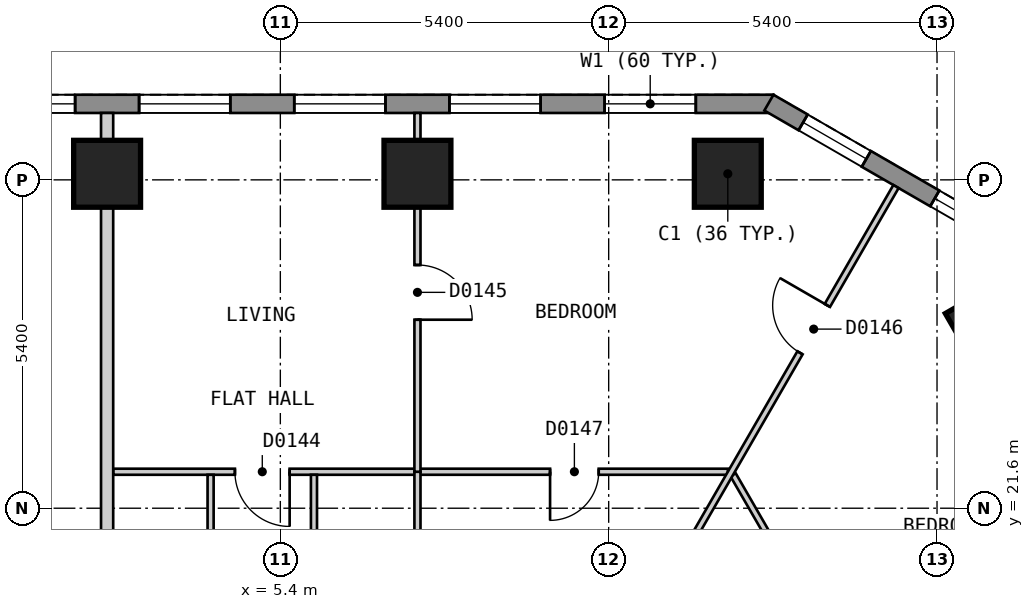
"""IFC4 building model, lengths in metres.
Left out: names, types, materials, properties, quantities, classifications, styles, units other than length and angle.
Written with IfcOpenShell. Run it as: python <this file> out.ifc"""

import sys

from ifc_helpers import new_model, si_unit, direction, frame, frame_2d, origin, origin_2d, place, context, subcontext, project, spatial, polyline, rectangle, outline, extrude, element, fill, save


model = new_model("IFC4")
c1 = context("Model", 3, precision=1e-05, world=origin(), true_north=direction((0.0, 1.0)))
c2 = subcontext(c1, "Body", "Model", "MODEL_VIEW")
j1 = project(units=[si_unit("LENGTHUNIT", "METRE"), si_unit("PLANEANGLEUNIT", "RADIAN")], contexts=[c1])
p1 = place(None, origin())
s1 = spatial("IfcSite", under=j1, at=p1, CompositionType="ELEMENT")
p2 = place(p1, origin())
s2 = spatial("IfcBuilding", under=s1, at=p2, CompositionType="ELEMENT")
p3 = place(p2, frame((0.0, 0.0, 29.4)))
s3 = spatial("IfcBuildingStorey", under=s2, at=p3, CompositionType="ELEMENT", Elevation=29.4)
for number, where, z_axis, x_axis in (
    (1, (12.759, 27.1, 0.0), (0.0, 0.0, 1.0), (-1.0, 0.0, 0.0)),
    (2, (7.655, 27.1, 0.0), (0.0, 0.0, 1.0), (-1.0, 0.0, 0.0)),
    (3, (2.551, 27.1, 0.0), (0.0, 0.0, 1.0), (-1.0, 0.0, 0.0)),
    (4, (17.089, 24.601, 0.0), (0.0, 0.0, 1.0), (-0.5, 0.866, 0.0)),
):
    element("IfcColumn", number, at=place(p3, frame(where, z_axis=z_axis, x_axis=x_axis)), inside=s3, PredefinedType="COLUMN", context=c2, shape_type="SweptSolid", body=[
        extrude(rectangle(XDim=1.1, YDim=1.1, at=origin_2d()), origin(), (0.0, 0.0, 1.0), 3.0),
    ])
p4 = place(p3, frame((13.51, 28.25, 0.0), z_axis=(0.0, 0.0, 1.0), x_axis=(-1.0, 0.0, 0.0)))
e5 = element("IfcWall", 5, at=p4, inside=s3, PredefinedType="SOLIDWALL", context=c2, shape_type="SweptSolid", body=[
    extrude(outline(polyline([(0.0, -0.15), (27.02, -0.15), (26.94, 0.15), (0.08, 0.15), (0.0, -0.15)])), origin(), (0.0, 0.0, 1.0), 2.7),
])
p5 = place(p4, frame((1.277, 0.0, 0.15)))
e6 = element("IfcOpeningElement", 6, at=p5, cuts=e5, PredefinedType="OPENING", context=c2, shape_type="SweptSolid", body=[
    extrude(rectangle(XDim=1.5, YDim=2.1, at=frame_2d((0.75, 1.05))), frame((0.0, 0.16, 0.0), z_axis=(0.0, -1.0, 0.0), x_axis=(1.0, 0.0, 0.0)), (0.0, 0.0, 1.0), 0.32),
])
p6 = place(p4, frame((3.829, 0.0, 0.15)))
e7 = element("IfcOpeningElement", 7, at=p6, cuts=e5, PredefinedType="OPENING", context=c2, shape_type="SweptSolid", body=[
    extrude(rectangle(XDim=1.5, YDim=2.1, at=frame_2d((0.75, 1.05))), frame((0.0, 0.16, 0.0), z_axis=(0.0, -1.0, 0.0), x_axis=(1.0, 0.0, 0.0)), (0.0, 0.0, 1.0), 0.32),
])
p7 = place(p4, frame((6.381, 0.0, 0.15)))
e8 = element("IfcOpeningElement", 8, at=p7, cuts=e5, PredefinedType="OPENING", context=c2, shape_type="SweptSolid", body=[
    extrude(rectangle(XDim=1.5, YDim=2.1, at=frame_2d((0.75, 1.05))), frame((0.0, 0.16, 0.0), z_axis=(0.0, -1.0, 0.0), x_axis=(1.0, 0.0, 0.0)), (0.0, 0.0, 1.0), 0.32),
])
p8 = place(p4, frame((8.933, 0.0, 0.15)))
e9 = element("IfcOpeningElement", 9, at=p8, cuts=e5, PredefinedType="OPENING", context=c2, shape_type="SweptSolid", body=[
    extrude(rectangle(XDim=1.5, YDim=2.1, at=frame_2d((0.75, 1.05))), frame((0.0, 0.16, 0.0), z_axis=(0.0, -1.0, 0.0), x_axis=(1.0, 0.0, 0.0)), (0.0, 0.0, 1.0), 0.32),
])
p9 = place(p4, frame((11.485, 0.0, 0.15)))
e10 = element("IfcOpeningElement", 10, at=p9, cuts=e5, PredefinedType="OPENING", context=c2, shape_type="SweptSolid", body=[
    extrude(rectangle(XDim=1.5, YDim=2.1, at=frame_2d((0.75, 1.05))), frame((0.0, 0.16, 0.0), z_axis=(0.0, -1.0, 0.0), x_axis=(1.0, 0.0, 0.0)), (0.0, 0.0, 1.0), 0.32),
])
p10 = place(p4, frame((14.037, 0.0, 0.15)))
e11 = element("IfcOpeningElement", 11, at=p10, cuts=e5, PredefinedType="OPENING", context=c2, shape_type="SweptSolid", body=[
    extrude(rectangle(XDim=1.5, YDim=2.1, at=frame_2d((0.75, 1.05))), frame((0.0, 0.16, 0.0), z_axis=(0.0, -1.0, 0.0), x_axis=(1.0, 0.0, 0.0)), (0.0, 0.0, 1.0), 0.32),
])
p11 = place(p4, frame((16.589, 0.0, 0.15)))
e12 = element("IfcOpeningElement", 12, at=p11, cuts=e5, PredefinedType="OPENING", context=c2, shape_type="SweptSolid", body=[
    extrude(rectangle(XDim=1.5, YDim=2.1, at=frame_2d((0.75, 1.05))), frame((0.0, 0.16, 0.0), z_axis=(0.0, -1.0, 0.0), x_axis=(1.0, 0.0, 0.0)), (0.0, 0.0, 1.0), 0.32),
])
p12 = place(p4, frame((19.141, 0.0, 0.15)))
e13 = element("IfcOpeningElement", 13, at=p12, cuts=e5, PredefinedType="OPENING", context=c2, shape_type="SweptSolid", body=[
    extrude(rectangle(XDim=1.5, YDim=2.1, at=frame_2d((0.75, 1.05))), frame((0.0, 0.16, 0.0), z_axis=(0.0, -1.0, 0.0), x_axis=(1.0, 0.0, 0.0)), (0.0, 0.0, 1.0), 0.32),
])
p13 = place(p4, frame((21.693, 0.0, 0.15)))
e14 = element("IfcOpeningElement", 14, at=p13, cuts=e5, PredefinedType="OPENING", context=c2, shape_type="SweptSolid", body=[
    extrude(rectangle(XDim=1.5, YDim=2.1, at=frame_2d((0.75, 1.05))), frame((0.0, 0.16, 0.0), z_axis=(0.0, -1.0, 0.0), x_axis=(1.0, 0.0, 0.0)), (0.0, 0.0, 1.0), 0.32),
])
p14 = place(p4, frame((24.245, 0.0, 0.15)))
e15 = element("IfcOpeningElement", 15, at=p14, cuts=e5, PredefinedType="OPENING", context=c2, shape_type="SweptSolid", body=[
    extrude(rectangle(XDim=1.5, YDim=2.1, at=frame_2d((0.75, 1.05))), frame((0.0, 0.16, 0.0), z_axis=(0.0, -1.0, 0.0), x_axis=(1.0, 0.0, 0.0)), (0.0, 0.0, 1.0), 0.32),
])
p15 = place(p3, frame((17.765, 25.77, 0.0), z_axis=(0.0, 0.0, 1.0), x_axis=(-0.866010750942, 0.50002537861, 0.0)))
e16 = element("IfcWall", 16, at=p15, inside=s3, PredefinedType="SOLIDWALL", context=c2, shape_type="SweptSolid", body=[
    extrude(outline(polyline([(0.0, -0.15), (5.0, -0.15), (4.919, 0.15), (0.08, 0.15), (0.0, -0.15)])), origin(), (0.0, 0.0, 1.0), 2.7),
])
p16 = place(p15, frame((0.65, 0.0, 0.15)))
e17 = element("IfcOpeningElement", 17, at=p16, cuts=e16, PredefinedType="OPENING", context=c2, shape_type="SweptSolid", body=[
    extrude(rectangle(XDim=1.2, YDim=2.1, at=frame_2d((0.6, 1.05))), frame((0.0, 0.16, 0.0), z_axis=(0.0, -1.0, 0.0), x_axis=(1.0, 0.0, 0.0)), (0.0, 0.0, 1.0), 0.32),
])
p17 = place(p15, frame((3.15, 0.0, 0.15)))
e18 = element("IfcOpeningElement", 18, at=p17, cuts=e16, PredefinedType="OPENING", context=c2, shape_type="SweptSolid", body=[
    extrude(rectangle(XDim=1.2, YDim=2.1, at=frame_2d((0.6, 1.05))), frame((0.0, 0.16, 0.0), z_axis=(0.0, -1.0, 0.0), x_axis=(1.0, 0.0, 0.0)), (0.0, 0.0, 1.0), 0.32),
])
p18 = place(p3, frame((12.846, 22.15, 0.0), z_axis=(0.0, 0.0, 1.0), x_axis=(0.500002715276, -0.866023836113, 0.0)))
e19 = element("IfcWall", 19, at=p18, inside=s3, PredefinedType="PARTITIONING", context=c2, shape_type="SweptSolid", body=[
    extrude(rectangle(XDim=5.002, YDim=0.1, at=frame_2d((2.501, 0.0))), origin(), (0.0, 0.0, 1.0), 2.7),
])
p19 = place(p18, frame((2.122, 0.0, 0.0)))
e20 = element("IfcOpeningElement", 20, at=p19, cuts=e19, PredefinedType="OPENING", context=c2, shape_type="SweptSolid", body=[
    extrude(rectangle(XDim=0.8, YDim=2.1, at=frame_2d((0.4, 1.05))), frame((0.0, 0.06, 0.0), z_axis=(0.0, -1.0, 0.0), x_axis=(1.0, 0.0, 0.0)), (0.0, 0.0, 1.0), 0.12),
])
p20 = place(p3, frame((2.651, 22.2, 0.0), z_axis=(0.0, 0.0, 1.0), x_axis=(1.0, 0.0, 0.0)))
e21 = element("IfcWall", 21, at=p20, inside=s3, PredefinedType="PARTITIONING", context=c2, shape_type="SweptSolid", body=[
    extrude(rectangle(XDim=10.109, YDim=0.1, at=frame_2d((5.055, 0.0))), origin(), (0.0, 0.0, 1.0), 2.7),
])
p21 = place(p20, frame((2.002, 0.0, 0.0)))
e22 = element("IfcOpeningElement", 22, at=p21, cuts=e21, PredefinedType="OPENING", context=c2, shape_type="SweptSolid", body=[
    extrude(rectangle(XDim=0.9, YDim=2.1, at=frame_2d((0.45, 1.05))), frame((0.0, 0.06, 0.0), z_axis=(0.0, -1.0, 0.0), x_axis=(1.0, 0.0, 0.0)), (0.0, 0.0, 1.0), 0.12),
])
p22 = place(p20, frame((7.185, 0.0, 0.0)))
e23 = element("IfcOpeningElement", 23, at=p22, cuts=e21, PredefinedType="OPENING", context=c2, shape_type="SweptSolid", body=[
    extrude(rectangle(XDim=0.8, YDim=2.1, at=frame_2d((0.4, 1.05))), frame((0.0, 0.06, 0.0), z_axis=(0.0, -1.0, 0.0), x_axis=(1.0, 0.0, 0.0)), (0.0, 0.0, 1.0), 0.12),
])
p23 = place(p3, frame((10.393, 18.0, 0.0), z_axis=(0.0, 0.0, 1.0), x_axis=(0.499945497007, 0.866056868816, 0.0)))
e24 = element("IfcWall", 24, at=p23, inside=s3, PredefinedType="PARTITIONING", context=c2, shape_type="SweptSolid", body=[
    extrude(rectangle(XDim=10.265, YDim=0.1, at=frame_2d((5.132, 0.0))), origin(), (0.0, 0.0, 1.0), 2.7),
])
p24 = place(p23, frame((7.108, 0.0, 0.0)))
e25 = element("IfcOpeningElement", 25, at=p24, cuts=e24, PredefinedType="OPENING", context=c2, shape_type="SweptSolid", body=[
    extrude(rectangle(XDim=0.9, YDim=2.1, at=frame_2d((0.45, 1.05))), frame((0.0, 0.06, 0.0), z_axis=(0.0, -1.0, 0.0), x_axis=(1.0, 0.0, 0.0)), (0.0, 0.0, 1.0), 0.12),
])
p25 = place(p3, frame((4.253, 18.1, 0.0), z_axis=(0.0, 0.0, 1.0), x_axis=(0.0, 1.0, 0.0)))
e26 = element("IfcWall", 26, at=p25, inside=s3, PredefinedType="PARTITIONING", context=c2, shape_type="SweptSolid", body=[
    extrude(rectangle(XDim=4.05, YDim=0.1, at=frame_2d((2.025, 0.0))), origin(), (0.0, 0.0, 1.0), 2.7),
])
p26 = place(p25, frame((1.6, 0.0, 0.0)))
e27 = element("IfcOpeningElement", 27, at=p26, cuts=e26, PredefinedType="OPENING", context=c2, shape_type="SweptSolid", body=[
    extrude(rectangle(XDim=0.8, YDim=2.1, at=frame_2d((0.4, 1.05))), frame((0.0, 0.06, 0.0), z_axis=(0.0, -1.0, 0.0), x_axis=(1.0, 0.0, 0.0)), (0.0, 0.0, 1.0), 0.12),
])
p27 = place(p3, frame((5.953, 18.1, 0.0), z_axis=(0.0, 0.0, 1.0), x_axis=(0.0, 1.0, 0.0)))
e28 = element("IfcWall", 28, at=p27, inside=s3, PredefinedType="PARTITIONING", context=c2, shape_type="SweptSolid", body=[
    extrude(rectangle(XDim=4.05, YDim=0.1, at=frame_2d((2.025, 0.0))), origin(), (0.0, 0.0, 1.0), 2.7),
])
p28 = place(p27, frame((1.55, 0.0, 0.0)))
e29 = element("IfcOpeningElement", 29, at=p28, cuts=e28, PredefinedType="OPENING", context=c2, shape_type="SweptSolid", body=[
    extrude(rectangle(XDim=0.9, YDim=2.1, at=frame_2d((0.45, 1.05))), frame((0.0, 0.06, 0.0), z_axis=(0.0, -1.0, 0.0), x_axis=(1.0, 0.0, 0.0)), (0.0, 0.0, 1.0), 0.12),
])
p29 = place(p3, frame((7.655, 18.1, 0.0), z_axis=(0.0, 0.0, 1.0), x_axis=(0.0, 1.0, 0.0)))
e30 = element("IfcWall", 30, at=p29, inside=s3, PredefinedType="PARTITIONING", context=c2, shape_type="SweptSolid", body=[
    extrude(rectangle(XDim=4.1, YDim=0.1, at=frame_2d((2.05, 0.0))), origin(), (0.0, 0.0, 1.0), 2.7),
])
p30 = place(p3, frame((2.551, 18.1, 0.0), z_axis=(0.0, 0.0, 1.0), x_axis=(0.0, 1.0, 0.0)))
e31 = element("IfcWall", 31, at=p30, inside=s3, PredefinedType="PARTITIONING", context=c2, shape_type="SweptSolid", body=[
    extrude(rectangle(XDim=10.0, YDim=0.2, at=frame_2d((5.0, 0.0))), origin(), (0.0, 0.0, 1.0), 2.7),
])
p31 = place(p3, frame((7.655, 22.2, 0.0), z_axis=(0.0, 0.0, 1.0), x_axis=(0.0, 1.0, 0.0)))
e32 = element("IfcWall", 32, at=p31, inside=s3, PredefinedType="PARTITIONING", context=c2, shape_type="SweptSolid", body=[
    extrude(rectangle(XDim=5.9, YDim=0.1, at=frame_2d((2.95, 0.0))), origin(), (0.0, 0.0, 1.0), 2.7),
])
p32 = place(p31, frame((2.5, 0.0, 0.0)))
e33 = element("IfcOpeningElement", 33, at=p32, cuts=e32, PredefinedType="OPENING", context=c2, shape_type="SweptSolid", body=[
    extrude(rectangle(XDim=0.9, YDim=2.1, at=frame_2d((0.45, 1.05))), frame((0.0, 0.06, 0.0), z_axis=(0.0, -1.0, 0.0), x_axis=(1.0, 0.0, 0.0)), (0.0, 0.0, 1.0), 0.12),
])
p33 = place(p5, origin())
e34 = element("IfcWindow", 34, at=p33, inside=s3, PartitioningType="SINGLE_PANEL", PredefinedType="WINDOW", context=c2, shape_type="SweptSolid", body=[
    extrude(rectangle(XDim=1.5, YDim=2.1, at=frame_2d((0.75, 1.05))), frame((0.0, 0.03, 0.0), z_axis=(0.0, -1.0, 0.0), x_axis=(1.0, 0.0, 0.0)), (0.0, 0.0, 1.0), 0.06),
])
fill(e6, e34)
p34 = place(p6, origin())
e35 = element("IfcWindow", 35, at=p34, inside=s3, PartitioningType="SINGLE_PANEL", PredefinedType="WINDOW", context=c2, shape_type="SweptSolid", body=[
    extrude(rectangle(XDim=1.5, YDim=2.1, at=frame_2d((0.75, 1.05))), frame((0.0, 0.03, 0.0), z_axis=(0.0, -1.0, 0.0), x_axis=(1.0, 0.0, 0.0)), (0.0, 0.0, 1.0), 0.06),
])
fill(e7, e35)
p35 = place(p7, origin())
e36 = element("IfcWindow", 36, at=p35, inside=s3, PartitioningType="SINGLE_PANEL", PredefinedType="WINDOW", context=c2, shape_type="SweptSolid", body=[
    extrude(rectangle(XDim=1.5, YDim=2.1, at=frame_2d((0.75, 1.05))), frame((0.0, 0.03, 0.0), z_axis=(0.0, -1.0, 0.0), x_axis=(1.0, 0.0, 0.0)), (0.0, 0.0, 1.0), 0.06),
])
fill(e8, e36)
p36 = place(p8, origin())
e37 = element("IfcWindow", 37, at=p36, inside=s3, PartitioningType="SINGLE_PANEL", PredefinedType="WINDOW", context=c2, shape_type="SweptSolid", body=[
    extrude(rectangle(XDim=1.5, YDim=2.1, at=frame_2d((0.75, 1.05))), frame((0.0, 0.03, 0.0), z_axis=(0.0, -1.0, 0.0), x_axis=(1.0, 0.0, 0.0)), (0.0, 0.0, 1.0), 0.06),
])
fill(e9, e37)
p37 = place(p9, origin())
e38 = element("IfcWindow", 38, at=p37, inside=s3, PartitioningType="SINGLE_PANEL", PredefinedType="WINDOW", context=c2, shape_type="SweptSolid", body=[
    extrude(rectangle(XDim=1.5, YDim=2.1, at=frame_2d((0.75, 1.05))), frame((0.0, 0.03, 0.0), z_axis=(0.0, -1.0, 0.0), x_axis=(1.0, 0.0, 0.0)), (0.0, 0.0, 1.0), 0.06),
])
fill(e10, e38)
p38 = place(p16, origin())
e39 = element("IfcWindow", 39, at=p38, inside=s3, PartitioningType="SINGLE_PANEL", PredefinedType="WINDOW", context=c2, shape_type="SweptSolid", body=[
    extrude(rectangle(XDim=1.2, YDim=2.1, at=frame_2d((0.6, 1.05))), frame((0.0, 0.03, 0.0), z_axis=(0.0, -1.0, 0.0), x_axis=(1.0, 0.0, 0.0)), (0.0, 0.0, 1.0), 0.06),
])
fill(e17, e39)
p39 = place(p17, origin())
e40 = element("IfcWindow", 40, at=p39, inside=s3, PartitioningType="SINGLE_PANEL", PredefinedType="WINDOW", context=c2, shape_type="SweptSolid", body=[
    extrude(rectangle(XDim=1.2, YDim=2.1, at=frame_2d((0.6, 1.05))), frame((0.0, 0.03, 0.0), z_axis=(0.0, -1.0, 0.0), x_axis=(1.0, 0.0, 0.0)), (0.0, 0.0, 1.0), 0.06),
])
fill(e18, e40)
p40 = place(p21, origin())
e41 = element("IfcDoor", 41, at=p40, inside=s3, OperationType="SINGLE_SWING_RIGHT", PredefinedType="DOOR", context=c2, shape_type="SweptSolid", body=[
    extrude(rectangle(XDim=0.9, YDim=2.1, at=frame_2d((0.45, 1.05))), frame((0.0, 0.025, 0.0), z_axis=(0.0, -1.0, 0.0), x_axis=(1.0, 0.0, 0.0)), (0.0, 0.0, 1.0), 0.05),
])
fill(e22, e41)
p41 = place(p32, origin())
e42 = element("IfcDoor", 42, at=p41, inside=s3, OperationType="SINGLE_SWING_LEFT", PredefinedType="DOOR", context=c2, shape_type="SweptSolid", body=[
    extrude(rectangle(XDim=0.9, YDim=2.1, at=frame_2d((0.45, 1.05))), frame((0.0, 0.025, 0.0), z_axis=(0.0, -1.0, 0.0), x_axis=(1.0, 0.0, 0.0)), (0.0, 0.0, 1.0), 0.05),
])
fill(e33, e42)
p42 = place(p24, origin())
e43 = element("IfcDoor", 43, at=p42, inside=s3, OperationType="SINGLE_SWING_RIGHT", PredefinedType="DOOR", context=c2, shape_type="SweptSolid", body=[
    extrude(rectangle(XDim=0.9, YDim=2.1, at=frame_2d((0.45, 1.05))), frame((0.0, 0.025, 0.0), z_axis=(0.0, -1.0, 0.0), x_axis=(1.0, 0.0, 0.0)), (0.0, 0.0, 1.0), 0.05),
])
fill(e25, e43)
p43 = place(p22, origin())
e44 = element("IfcDoor", 44, at=p43, inside=s3, OperationType="SINGLE_SWING_LEFT", PredefinedType="DOOR", context=c2, shape_type="SweptSolid", body=[
    extrude(rectangle(XDim=0.8, YDim=2.1, at=frame_2d((0.4, 1.05))), frame((0.0, 0.025, 0.0), z_axis=(0.0, -1.0, 0.0), x_axis=(1.0, 0.0, 0.0)), (0.0, 0.0, 1.0), 0.05),
])
fill(e23, e44)
save(model, sys.argv[1])
